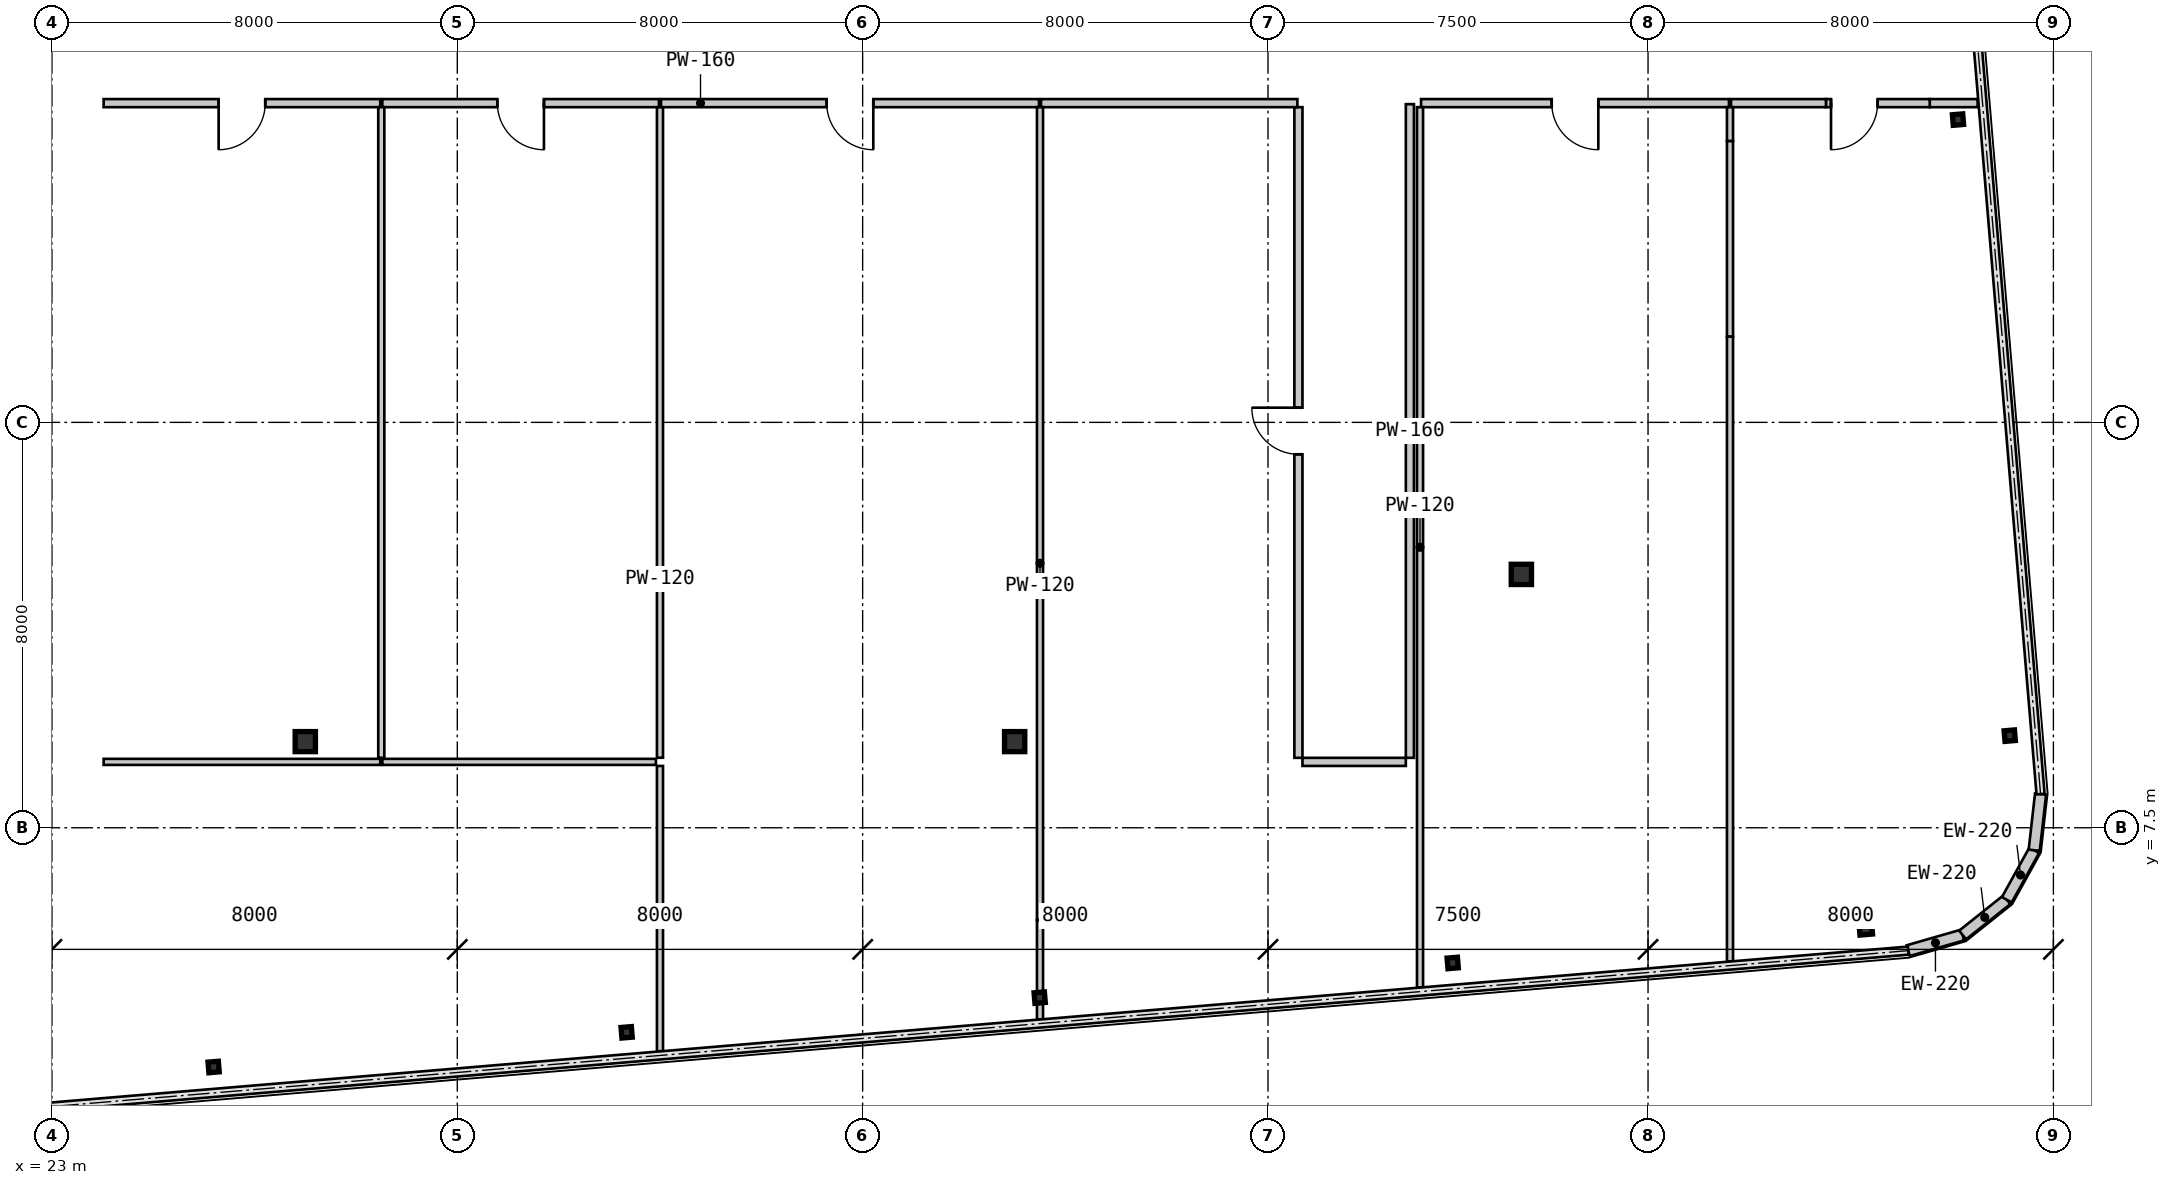
"""IFC4 building model, lengths in metres.
Left out: names, types, materials, properties, quantities, classifications, styles, units other than length and angle.
Written with IfcOpenShell. Run it as: python <this file> out.ifc"""

import sys

from ifc_helpers import new_model, si_unit, direction, frame, frame_2d, origin, origin_2d, place, context, subcontext, project, spatial, rectangle, hollow_rectangle, i_section, extrude, source, transform, mapped, element, fill, save


model = new_model("IFC4")
c1 = context("Model", 3, precision=1e-05, world=origin(), true_north=direction((0.0, 1.0)))
c2 = subcontext(c1, "Body", "Model", "MODEL_VIEW")
j1 = project(units=[si_unit("LENGTHUNIT", "METRE"), si_unit("PLANEANGLEUNIT", "RADIAN")], contexts=[c1])
p1 = place(None, origin())
s1 = spatial("IfcSite", under=j1, at=p1, CompositionType="ELEMENT")
p2 = place(p1, origin())
s2 = spatial("IfcBuilding", under=s1, at=p2, CompositionType="ELEMENT")
p3 = place(p2, frame((0.0, 0.0, 185.15)))
s3 = spatial("IfcBuildingStorey", under=s2, at=p3, CompositionType="ELEMENT", Elevation=185.15)
m1 = source(origin(), c2, "Body", "SweptSolid", [
    extrude(i_section(OverallWidth=0.4, OverallDepth=0.396, WebThickness=0.022, FlangeThickness=0.034, at=origin_2d()), origin(), (0.0, 0.0, 1.0), 3.15),
])
for number, where, z_axis, x_axis in (
    (1, (28.0, 9.2, 0.0), (0.0, 0.0, 1.0), (1.0, 0.0, 0.0)),
    (2, (42.0, 9.2, 0.0), (0.0, 0.0, 1.0), (1.0, 0.0, 0.0)),
):
    element("IfcColumn", number, at=place(p3, frame(where, z_axis=z_axis, x_axis=x_axis)), inside=s3, PredefinedType="COLUMN", context=c2, shape_type="MappedRepresentation", body=[
        mapped(m1, transform((0.0, 0.0, 0.0), scale=1.0)),
    ])
m2 = source(origin(), c2, "Body", "SweptSolid", [
    extrude(hollow_rectangle(XDim=0.4, YDim=0.4, WallThickness=0.016, at=origin_2d()), origin(), (0.0, 0.0, 1.0), 3.15),
])
p4 = place(p3, frame((52.0, 12.5, 0.0), z_axis=(0.0, 0.0, 1.0), x_axis=(1.0, 0.0, 0.0)))
e3 = element("IfcColumn", 3, at=p4, inside=s3, PredefinedType="COLUMN", context=c2, shape_type="MappedRepresentation", body=[
    mapped(m2, transform((0.0, 0.0, 0.0), scale=1.0)),
])
m3 = source(origin(), c2, "Body", "SweptSolid", [
    extrude(i_section(OverallWidth=0.205, OverallDepth=0.21, WebThickness=0.009, FlangeThickness=0.014, at=origin_2d()), origin(), (0.0, 0.0, 1.0), 3.15),
])
for number, where, z_axis, x_axis in (
    (4, (26.191, 2.779, 0.0), (0.0, 0.0, 1.0), (0.996, 0.084, 0.0)),
    (5, (34.342, 3.463, 0.0), (0.0, 0.0, 1.0), (0.996, 0.084, 0.0)),
    (6, (42.494, 4.147, 0.0), (0.0, 0.0, 1.0), (0.996, 0.084, 0.0)),
    (7, (50.645, 4.832, 0.0), (0.0, 0.0, 1.0), (0.996, 0.084, 0.0)),
):
    element("IfcColumn", number, at=place(p3, frame(where, z_axis=z_axis, x_axis=x_axis)), inside=s3, PredefinedType="COLUMN", context=c2, shape_type="MappedRepresentation", body=[
        mapped(m3, transform((0.0, 0.0, 0.0), scale=1.0)),
    ])
m4 = source(origin(), c2, "Body", "SweptSolid", [
    extrude(hollow_rectangle(XDim=0.25, YDim=0.25, WallThickness=0.01, at=origin_2d()), origin(), (0.0, 0.0, 1.0), 3.15),
])
p5 = place(p3, frame((58.796, 5.516, 0.0), z_axis=(0.0, 0.0, 1.0), x_axis=(0.99649285925, 0.083677843332, 0.0)))
e8 = element("IfcColumn", 8, at=p5, inside=s3, PredefinedType="COLUMN", context=c2, shape_type="MappedRepresentation", body=[
    mapped(m4, transform((0.0, 0.0, 0.0), scale=1.0)),
])
for number, where, z_axis, x_axis in (
    (9, (61.638, 9.318, 0.0), (0.0, 0.0, 1.0), (0.996, 0.084, 0.0)),
    (10, (60.617, 21.475, 0.0), (0.0, 0.0, 1.0), (0.996, 0.084, 0.0)),
):
    element("IfcColumn", number, at=place(p3, frame(where, z_axis=z_axis, x_axis=x_axis)), inside=s3, PredefinedType="COLUMN", context=c2, shape_type="MappedRepresentation", body=[
        mapped(m3, transform((0.0, 0.0, 0.0), scale=1.0)),
    ])
m5 = source(origin(), c2, "Body", "SweptSolid", [
    extrude(rectangle(XDim=1.116, YDim=0.22, at=frame_2d((0.558, 0.0))), origin(), (0.0, 0.0, 1.0), 2.93),
])
for number, where, z_axis, x_axis in (
    (11, (59.636, 5.075, 0.0), (0.0, 0.0, 1.0), (0.961, 0.277, 0.0)),
    (12, (60.708, 5.384, 0.0), (0.0, 0.0, 1.0), (0.782, 0.623, 0.0)),
    (13, (61.581, 6.079, 0.0), (0.0, 0.0, 1.0), (0.484, 0.875, 0.0)),
    (14, (62.121, 7.056, 0.0), (0.0, 0.0, 1.0), (0.112, 0.994, 0.0)),
):
    element("IfcWall", number, at=place(p3, frame(where, z_axis=z_axis, x_axis=x_axis)), inside=s3, PredefinedType="SOLIDWALL", context=c2, shape_type="MappedRepresentation", body=[
        mapped(m5, transform((0.0, 0.0, 0.0), scale=1.0)),
    ])
m6 = source(origin(), c2, "Body", "SweptSolid", [
    extrude(rectangle(XDim=5.459, YDim=0.16, at=frame_2d((2.73, 0.0))), origin(), (0.0, 0.0, 1.0), 2.93),
])
p6 = place(p3, frame((29.48, 21.8, 0.0), z_axis=(0.0, 0.0, 1.0), x_axis=(-1.0, 0.0, 0.0)))
e15 = element("IfcWall", 15, at=p6, inside=s3, PredefinedType="PARTITIONING", context=c2, shape_type="MappedRepresentation", body=[
    mapped(m6, transform((0.0, 0.0, 0.0), scale=1.0)),
])
m7 = source(origin(), c2, "Body", "SweptSolid", [
    extrude(rectangle(XDim=0.92, YDim=2.1, at=frame_2d((0.46, 1.05))), frame((0.0, 0.09, 0.0), z_axis=(0.0, -1.0, 0.0), x_axis=(1.0, 0.0, 0.0)), (0.0, 0.0, 1.0), 0.18),
])
p7 = place(p6, frame((2.27, 0.0, 0.0)))
e16 = element("IfcOpeningElement", 16, at=p7, cuts=e15, PredefinedType="OPENING", context=c2, shape_type="MappedRepresentation", body=[
    mapped(m7, transform((0.0, 0.0, 0.0), scale=1.0)),
])
p8 = place(p3, frame((34.98, 21.8, 0.0), z_axis=(0.0, 0.0, 1.0), x_axis=(-1.0, 0.0, 0.0)))
e17 = element("IfcWall", 17, at=p8, inside=s3, PredefinedType="PARTITIONING", context=c2, shape_type="MappedRepresentation", body=[
    mapped(m6, transform((0.0, 0.0, 0.0), scale=1.0)),
])
p9 = place(p8, frame((2.27, 0.0, 0.0)))
e18 = element("IfcOpeningElement", 18, at=p9, cuts=e17, PredefinedType="OPENING", context=c2, shape_type="MappedRepresentation", body=[
    mapped(m7, transform((0.0, 0.0, 0.0), scale=1.0)),
])
m8 = source(origin(), c2, "Body", "SweptSolid", [
    extrude(rectangle(XDim=7.459, YDim=0.16, at=frame_2d((3.73, 0.0))), origin(), (0.0, 0.0, 1.0), 2.93),
])
p10 = place(p3, frame((42.48, 21.8, 0.0), z_axis=(0.0, 0.0, 1.0), x_axis=(-1.0, 0.0, 0.0)))
e19 = element("IfcWall", 19, at=p10, inside=s3, PredefinedType="PARTITIONING", context=c2, shape_type="MappedRepresentation", body=[
    mapped(m8, transform((0.0, 0.0, 0.0), scale=1.0)),
])
p11 = place(p10, frame((3.27, 0.0, 0.0)))
e20 = element("IfcOpeningElement", 20, at=p11, cuts=e19, PredefinedType="OPENING", context=c2, shape_type="MappedRepresentation", body=[
    mapped(m7, transform((0.0, 0.0, 0.0), scale=1.0)),
])
m9 = source(origin(), c2, "Body", "SweptSolid", [
    extrude(rectangle(XDim=12.84, YDim=0.16, at=frame_2d((6.42, 0.0))), origin(), (0.0, 0.0, 1.0), 2.93),
])
p12 = place(p3, frame((47.6, 8.88, 0.0), z_axis=(0.0, 0.0, 1.0), x_axis=(0.0, 1.0, 0.0)))
e21 = element("IfcWall", 21, at=p12, inside=s3, PredefinedType="PARTITIONING", context=c2, shape_type="MappedRepresentation", body=[
    mapped(m9, transform((0.0, 0.0, 0.0), scale=1.0)),
])
p13 = place(p12, frame((5.99, 0.0, 0.0)))
e22 = element("IfcOpeningElement", 22, at=p13, cuts=e21, PredefinedType="OPENING", context=c2, shape_type="MappedRepresentation", body=[
    mapped(m7, transform((0.0, 0.0, 0.0), scale=1.0)),
])
m10 = source(origin(), c2, "Body", "SweptSolid", [
    extrude(rectangle(XDim=12.9, YDim=0.16, at=frame_2d((6.45, 0.0))), origin(), (0.0, 0.0, 1.0), 2.93),
])
p14 = place(p3, frame((49.8, 21.78, 0.0), z_axis=(0.0, 0.0, 1.0), x_axis=(0.0, -1.0, 0.0)))
e23 = element("IfcWall", 23, at=p14, inside=s3, PredefinedType="PARTITIONING", context=c2, shape_type="MappedRepresentation", body=[
    mapped(m10, transform((0.0, 0.0, 0.0), scale=1.0)),
])
m11 = source(origin(), c2, "Body", "SweptSolid", [
    extrude(rectangle(XDim=5.06, YDim=0.16, at=frame_2d((2.53, 0.0))), origin(), (0.0, 0.0, 1.0), 2.93),
])
p15 = place(p3, frame((47.58, 21.8, 0.0), z_axis=(0.0, 0.0, 1.0), x_axis=(-1.0, 0.0, 0.0)))
e24 = element("IfcWall", 24, at=p15, inside=s3, PredefinedType="PARTITIONING", context=c2, shape_type="MappedRepresentation", body=[
    mapped(m11, transform((0.0, 0.0, 0.0), scale=1.0)),
])
m12 = source(origin(), c2, "Body", "SweptSolid", [
    extrude(rectangle(XDim=2.04, YDim=0.16, at=frame_2d((1.02, 0.0))), origin(), (0.0, 0.0, 1.0), 2.93),
])
p16 = place(p3, frame((49.72, 8.8, 0.0), z_axis=(0.0, 0.0, 1.0), x_axis=(-1.0, 0.0, 0.0)))
e25 = element("IfcWall", 25, at=p16, inside=s3, PredefinedType="PARTITIONING", context=c2, shape_type="MappedRepresentation", body=[
    mapped(m12, transform((0.0, 0.0, 0.0), scale=1.0)),
])
m13 = source(origin(), c2, "Body", "SweptSolid", [
    extrude(rectangle(XDim=6.077, YDim=0.16, at=frame_2d((3.039, 0.0))), origin(), (0.0, 0.0, 1.0), 2.93),
])
p17 = place(p3, frame((56.097, 21.8, 0.0), z_axis=(0.0, 0.0, 1.0), x_axis=(-1.0, 0.0, 0.0)))
e26 = element("IfcWall", 26, at=p17, inside=s3, PredefinedType="PARTITIONING", context=c2, shape_type="MappedRepresentation", body=[
    mapped(m13, transform((0.0, 0.0, 0.0), scale=1.0)),
])
p18 = place(p17, frame((2.579, 0.0, 0.0)))
e27 = element("IfcOpeningElement", 27, at=p18, cuts=e26, PredefinedType="OPENING", context=c2, shape_type="MappedRepresentation", body=[
    mapped(m7, transform((0.0, 0.0, 0.0), scale=1.0)),
])
m14 = source(origin(), c2, "Body", "SweptSolid", [
    extrude(rectangle(XDim=0.945, YDim=0.16, at=frame_2d((0.473, 0.0))), origin(), (0.0, 0.0, 1.0), 2.93),
])
p19 = place(p3, frame((61.005, 21.8, 0.0), z_axis=(0.0, 0.0, 1.0), x_axis=(-1.0, 0.0, 0.0)))
e28 = element("IfcWall", 28, at=p19, inside=s3, PredefinedType="PARTITIONING", context=c2, shape_type="MappedRepresentation", body=[
    mapped(m14, transform((0.0, 0.0, 0.0), scale=1.0)),
])
m15 = source(origin(), c2, "Body", "SweptSolid", [
    extrude(rectangle(XDim=2.048, YDim=0.16, at=frame_2d((1.024, 0.0))), origin(), (0.0, 0.0, 1.0), 2.47),
])
p20 = place(p3, frame((60.059, 21.8, 0.0), z_axis=(0.0, 0.0, 1.0), x_axis=(-1.0, 0.0, 0.0)))
e29 = element("IfcWall", 29, at=p20, inside=s3, PredefinedType="PARTITIONING", context=c2, shape_type="MappedRepresentation", body=[
    mapped(m15, transform((0.0, 0.0, 0.0), scale=1.0)),
])
p21 = place(p20, frame((1.028, 0.0, 0.0)))
e30 = element("IfcOpeningElement", 30, at=p21, cuts=e29, PredefinedType="OPENING", context=c2, shape_type="MappedRepresentation", body=[
    mapped(m7, transform((0.0, 0.0, 0.0), scale=1.0)),
])
m16 = source(origin(), c2, "Body", "SweptSolid", [
    extrude(rectangle(XDim=1.874, YDim=0.16, at=frame_2d((0.937, 0.0))), origin(), (0.0, 0.0, 1.0), 2.93),
])
p22 = place(p3, frame((58.011, 21.8, 0.0), z_axis=(0.0, 0.0, 1.0), x_axis=(-1.0, 0.0, 0.0)))
e31 = element("IfcWall", 31, at=p22, inside=s3, PredefinedType="PARTITIONING", context=c2, shape_type="MappedRepresentation", body=[
    mapped(m16, transform((0.0, 0.0, 0.0), scale=1.0)),
])
m17 = source(origin(), c2, "Body", "SweptSolid", [
    extrude(rectangle(XDim=5.459, YDim=0.12, at=frame_2d((2.73, 0.0))), origin(), (0.0, 0.0, 1.0), 2.93),
])
p23 = place(p3, frame((24.02, 8.8, 0.0), z_axis=(0.0, 0.0, 1.0), x_axis=(1.0, 0.0, 0.0)))
e32 = element("IfcWall", 32, at=p23, inside=s3, PredefinedType="PARTITIONING", context=c2, shape_type="MappedRepresentation", body=[
    mapped(m17, transform((0.0, 0.0, 0.0), scale=1.0)),
])
m18 = source(origin(), c2, "Body", "SweptSolid", [
    extrude(rectangle(XDim=5.4, YDim=0.12, at=frame_2d((2.7, 0.0))), origin(), (0.0, 0.0, 1.0), 2.93),
])
p24 = place(p3, frame((29.52, 8.8, 0.0), z_axis=(0.0, 0.0, 1.0), x_axis=(1.0, 0.0, 0.0)))
e33 = element("IfcWall", 33, at=p24, inside=s3, PredefinedType="PARTITIONING", context=c2, shape_type="MappedRepresentation", body=[
    mapped(m18, transform((0.0, 0.0, 0.0), scale=1.0)),
])
m19 = source(origin(), c2, "Body", "SweptSolid", [
    extrude(rectangle(XDim=5.63, YDim=0.12, at=frame_2d((2.815, 0.0))), origin(), (0.0, 0.0, 1.0), 2.93),
])
p25 = place(p3, frame((35.0, 8.72, 0.0), z_axis=(0.0, 0.0, 1.0), x_axis=(0.0, -1.0, 0.0)))
e34 = element("IfcWall", 34, at=p25, inside=s3, PredefinedType="PARTITIONING", context=c2, shape_type="MappedRepresentation", body=[
    mapped(m19, transform((0.0, 0.0, 0.0), scale=1.0)),
])
m20 = source(origin(), c2, "Body", "SweptSolid", [
    extrude(rectangle(XDim=12.84, YDim=0.12, at=frame_2d((6.42, 0.0))), origin(), (0.0, 0.0, 1.0), 2.93),
])
p26 = place(p3, frame((29.5, 21.72, 0.0), z_axis=(0.0, 0.0, 1.0), x_axis=(0.0, -1.0, 0.0)))
e35 = element("IfcWall", 35, at=p26, inside=s3, PredefinedType="PARTITIONING", context=c2, shape_type="MappedRepresentation", body=[
    mapped(m20, transform((0.0, 0.0, 0.0), scale=1.0)),
])
m21 = source(origin(), c2, "Body", "SweptSolid", [
    extrude(rectangle(XDim=12.836, YDim=0.12, at=frame_2d((6.418, 0.0))), origin(), (0.0, 0.0, 1.0), 2.93),
])
p27 = place(p3, frame((35.0, 21.718, 0.0), z_axis=(0.0, 0.0, 1.0), x_axis=(0.0, -1.0, 0.0)))
e36 = element("IfcWall", 36, at=p27, inside=s3, PredefinedType="PARTITIONING", context=c2, shape_type="MappedRepresentation", body=[
    mapped(m21, transform((0.0, 0.0, 0.0), scale=1.0)),
])
m22 = source(origin(), c2, "Body", "SweptSolid", [
    extrude(rectangle(XDim=16.042, YDim=0.12, at=frame_2d((8.021, 0.0))), origin(), (0.0, 0.0, 1.0), 2.93),
])
p28 = place(p3, frame((42.5, 21.72, 0.0), z_axis=(0.0, 0.0, 1.0), x_axis=(0.0, -1.0, 0.0)))
e37 = element("IfcWall", 37, at=p28, inside=s3, PredefinedType="PARTITIONING", context=c2, shape_type="MappedRepresentation", body=[
    mapped(m22, transform((0.0, 0.0, 0.0), scale=1.0)),
])
m23 = source(origin(), c2, "Body", "SweptSolid", [
    extrude(rectangle(XDim=1.536, YDim=0.12, at=frame_2d((0.768, 0.0))), origin(), (0.0, 0.0, 1.0), 2.47),
])
p29 = place(p3, frame((42.5, 5.678, 0.0), z_axis=(0.0, 0.0, 1.0), x_axis=(0.0, -1.0, 0.0)))
e38 = element("IfcWall", 38, at=p29, inside=s3, PredefinedType="PARTITIONING", context=c2, shape_type="MappedRepresentation", body=[
    mapped(m23, transform((0.0, 0.0, 0.0), scale=1.0)),
])
m24 = source(origin(), c2, "Body", "SweptSolid", [
    extrude(rectangle(XDim=0.423, YDim=0.12, at=frame_2d((0.211, 0.0))), origin(), (0.0, 0.0, 1.0), 2.93),
])
p30 = place(p3, frame((42.5, 4.142, 0.0), z_axis=(0.0, 0.0, 1.0), x_axis=(0.0, -1.0, 0.0)))
e39 = element("IfcWall", 39, at=p30, inside=s3, PredefinedType="PARTITIONING", context=c2, shape_type="MappedRepresentation", body=[
    mapped(m24, transform((0.0, 0.0, 0.0), scale=1.0)),
])
m25 = source(origin(), c2, "Body", "SweptSolid", [
    extrude(rectangle(XDim=17.37, YDim=0.12, at=frame_2d((8.685, 0.0))), origin(), (0.0, 0.0, 1.0), 2.93),
])
p31 = place(p3, frame((50.0, 21.72, 0.0), z_axis=(0.0, 0.0, 1.0), x_axis=(0.0, -1.0, 0.0)))
e40 = element("IfcWall", 40, at=p31, inside=s3, PredefinedType="PARTITIONING", context=c2, shape_type="MappedRepresentation", body=[
    mapped(m25, transform((0.0, 0.0, 0.0), scale=1.0)),
])
m26 = source(origin(), c2, "Body", "SweptSolid", [
    extrude(rectangle(XDim=0.669, YDim=0.12, at=frame_2d((0.335, 0.0))), origin(), (0.0, 0.0, 1.0), 2.93),
])
p32 = place(p3, frame((56.118, 21.72, 0.0), z_axis=(0.0, 0.0, 1.0), x_axis=(0.0, -1.0, 0.0)))
e41 = element("IfcWall", 41, at=p32, inside=s3, PredefinedType="PARTITIONING", context=c2, shape_type="MappedRepresentation", body=[
    mapped(m26, transform((0.0, 0.0, 0.0), scale=1.0)),
])
m27 = source(origin(), c2, "Body", "SweptSolid", [
    extrude(rectangle(XDim=3.86, YDim=0.12, at=frame_2d((1.93, 0.0))), origin(), (0.0, 0.0, 1.0), 2.397),
])
p33 = place(p3, frame((56.118, 21.051, 0.0), z_axis=(0.0, 0.0, 1.0), x_axis=(0.0, -1.0, 0.0)))
e42 = element("IfcWall", 42, at=p33, inside=s3, PredefinedType="PARTITIONING", context=c2, shape_type="MappedRepresentation", body=[
    mapped(m27, transform((0.0, 0.0, 0.0), scale=1.0)),
])
m28 = source(origin(), c2, "Body", "SweptSolid", [
    extrude(rectangle(XDim=12.327, YDim=0.12, at=frame_2d((6.164, 0.0))), origin(), (0.0, 0.0, 1.0), 2.93),
])
p34 = place(p3, frame((56.118, 17.19, 0.0), z_axis=(0.0, 0.0, 1.0), x_axis=(0.0, -1.0, 0.0)))
e43 = element("IfcWall", 43, at=p34, inside=s3, PredefinedType="PARTITIONING", context=c2, shape_type="MappedRepresentation", body=[
    mapped(m28, transform((0.0, 0.0, 0.0), scale=1.0)),
])
m29 = source(origin(), c2, "Body", "SweptSolid", [
    extrude(rectangle(XDim=0.92, YDim=2.1, at=frame_2d((0.46, 1.05))), frame((0.0, 0.025, 0.0), z_axis=(0.0, -1.0, 0.0), x_axis=(1.0, 0.0, 0.0)), (0.0, 0.0, 1.0), 0.05),
])
p35 = place(p7, origin())
e44 = element("IfcDoor", 44, at=p35, inside=s3, OperationType="SINGLE_SWING_RIGHT", PredefinedType="DOOR", context=c2, shape_type="MappedRepresentation", body=[
    mapped(m29, transform((0.0, 0.0, 0.0), scale=1.0)),
])
fill(e16, e44)
p36 = place(p9, origin())
e45 = element("IfcDoor", 45, at=p36, inside=s3, OperationType="SINGLE_SWING_LEFT", PredefinedType="DOOR", context=c2, shape_type="MappedRepresentation", body=[
    mapped(m29, transform((0.0, 0.0, 0.0), scale=1.0)),
])
fill(e18, e45)
p37 = place(p11, origin())
e46 = element("IfcDoor", 46, at=p37, inside=s3, OperationType="SINGLE_SWING_LEFT", PredefinedType="DOOR", context=c2, shape_type="MappedRepresentation", body=[
    mapped(m29, transform((0.0, 0.0, 0.0), scale=1.0)),
])
fill(e20, e46)
p38 = place(p13, origin())
e47 = element("IfcDoor", 47, at=p38, inside=s3, OperationType="SINGLE_SWING_RIGHT", PredefinedType="DOOR", context=c2, shape_type="MappedRepresentation", body=[
    mapped(m29, transform((0.0, 0.0, 0.0), scale=1.0)),
])
fill(e22, e47)
p39 = place(p18, origin())
e48 = element("IfcDoor", 48, at=p39, inside=s3, OperationType="SINGLE_SWING_LEFT", PredefinedType="DOOR", context=c2, shape_type="MappedRepresentation", body=[
    mapped(m29, transform((0.0, 0.0, 0.0), scale=1.0)),
])
fill(e27, e48)
p40 = place(p21, origin())
e49 = element("IfcDoor", 49, at=p40, inside=s3, OperationType="SINGLE_SWING_RIGHT", PredefinedType="DOOR", context=c2, shape_type="MappedRepresentation", body=[
    mapped(m29, transform((0.0, 0.0, 0.0), scale=1.0)),
])
fill(e30, e49)
save(model, sys.argv[1])
